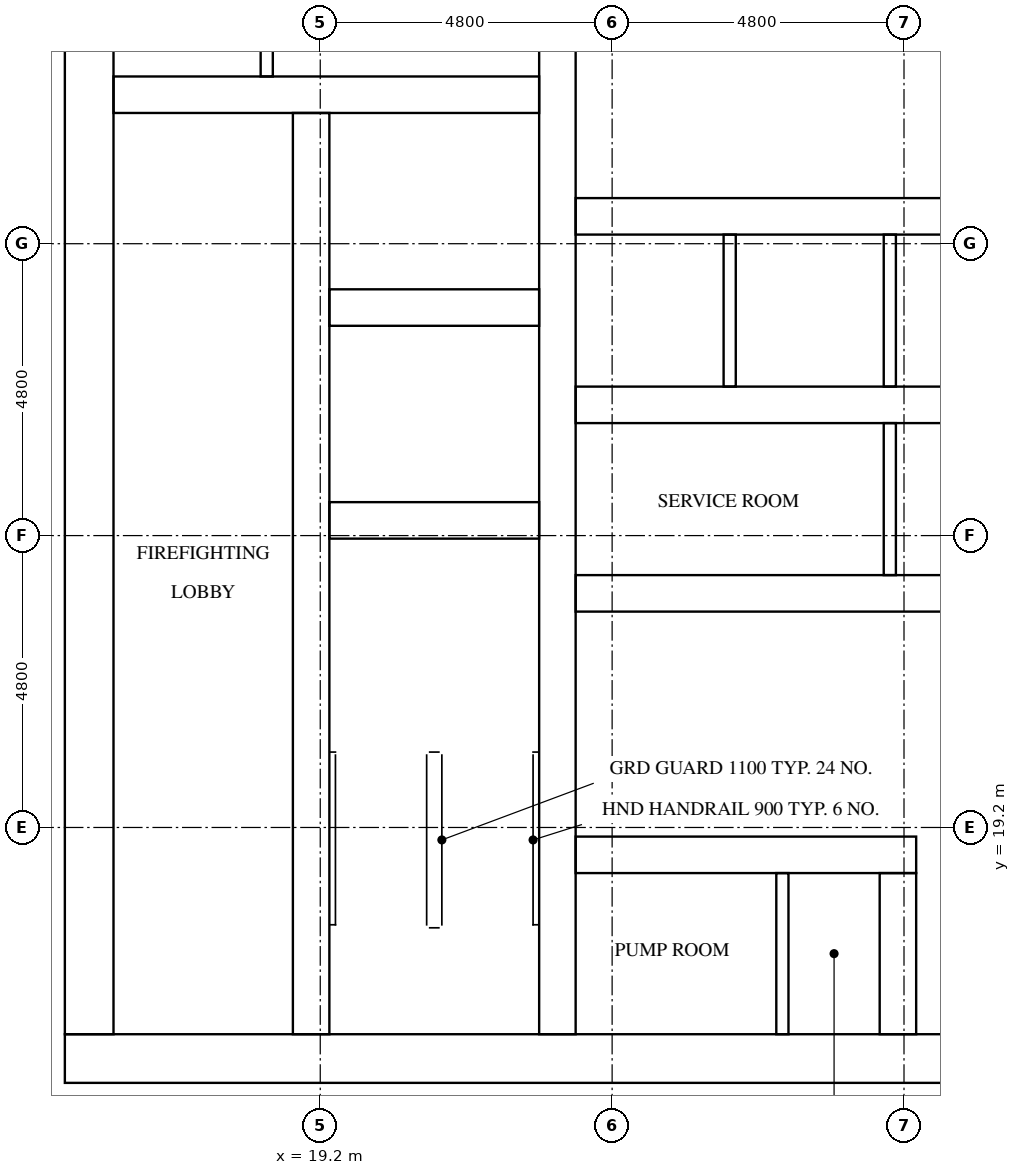
"""IFC4 building model, lengths in metres.
Left out: names, types, materials, properties, quantities, classifications, styles, units other than length and angle.
Written with IfcOpenShell. Run it as: python <this file> out.ifc"""

import sys

from ifc_helpers import new_model, si_unit, direction, frame, frame_2d, origin, place, context, subcontext, project, spatial, rectangle, extrude, element, fill, save


model = new_model("IFC4")
c1 = context("Model", 3, precision=1e-05, world=origin(), true_north=direction((0.0, 1.0)))
c2 = subcontext(c1, "Body", "Model", "MODEL_VIEW")
j1 = project(units=[si_unit("LENGTHUNIT", "METRE"), si_unit("PLANEANGLEUNIT", "RADIAN")], contexts=[c1])
p1 = place(None, origin())
s1 = spatial("IfcSite", under=j1, at=p1, CompositionType="ELEMENT")
p2 = place(p1, origin())
s2 = spatial("IfcBuilding", under=s1, at=p2, CompositionType="ELEMENT")
p3 = place(p2, frame((0.0, 0.0, 159.5)))
s3 = spatial("IfcBuildingStorey", under=s2, at=p3, CompositionType="ELEMENT", Elevation=159.5)
p4 = place(p3, frame((15.0, 15.4, 0.0), z_axis=(0.0, 0.0, 1.0), x_axis=(1.0, 0.0, 0.0)))
e1 = element("IfcWall", 1, at=p4, inside=s3, PredefinedType="SHEAR", context=c2, shape_type="SweptSolid", body=[
    extrude(rectangle(XDim=32.4, YDim=0.8, at=frame_2d((16.2, 0.0))), origin(), (0.0, 0.0, 1.0), 3.2),
])
p5 = place(p4, frame((15.3, 0.0, 0.0)))
e2 = element("IfcOpeningElement", 2, at=p5, cuts=e1, PredefinedType="OPENING", context=c2, shape_type="SweptSolid", body=[
    extrude(rectangle(XDim=1.8, YDim=2.1, at=frame_2d((0.9, 1.05))), frame((0.0, 0.41, 0.0), z_axis=(0.0, -1.0, 0.0), x_axis=(1.0, 0.0, 0.0)), (0.0, 0.0, 1.0), 0.82),
])
p6 = place(p3, frame((15.4, 15.8, 0.0), z_axis=(0.0, 0.0, 1.0), x_axis=(0.0, 1.0, 0.0)))
e3 = element("IfcWall", 3, at=p6, inside=s3, PredefinedType="SHEAR", context=c2, shape_type="SweptSolid", body=[
    extrude(rectangle(XDim=21.2, YDim=0.8, at=frame_2d((10.6, 0.0))), origin(), (0.0, 0.0, 1.0), 3.2),
])
p7 = place(p6, frame((4.96, 0.0, 0.0)))
e4 = element("IfcOpeningElement", 4, at=p7, cuts=e3, PredefinedType="OPENING", context=c2, shape_type="SweptSolid", body=[
    extrude(rectangle(XDim=1.2, YDim=2.1, at=frame_2d((0.6, 1.05))), frame((0.0, 0.41, 0.0), z_axis=(0.0, -1.0, 0.0), x_axis=(1.0, 0.0, 0.0)), (0.0, 0.0, 1.0), 0.82),
])
p8 = place(p3, frame((19.05, 15.8, 0.0), z_axis=(0.0, 0.0, 1.0), x_axis=(0.0, 1.0, 0.0)))
e5 = element("IfcWall", 5, at=p8, inside=s3, PredefinedType="SHEAR", context=c2, shape_type="SweptSolid", body=[
    extrude(rectangle(XDim=15.15, YDim=0.6, at=frame_2d((7.575, 0.0))), origin(), (0.0, 0.0, 1.0), 3.2),
])
p9 = place(p8, frame((9.65, 0.0, 0.0)))
e6 = element("IfcOpeningElement", 6, at=p9, cuts=e5, PredefinedType="OPENING", context=c2, shape_type="SweptSolid", body=[
    extrude(rectangle(XDim=1.1, YDim=2.1, at=frame_2d((0.55, 1.05))), frame((0.0, 0.31, 0.0), z_axis=(0.0, -1.0, 0.0), x_axis=(1.0, 0.0, 0.0)), (0.0, 0.0, 1.0), 0.62),
])
p10 = place(p8, frame((13.15, 0.0, 0.0)))
e7 = element("IfcOpeningElement", 7, at=p10, cuts=e5, PredefinedType="OPENING", context=c2, shape_type="SweptSolid", body=[
    extrude(rectangle(XDim=1.1, YDim=2.1, at=frame_2d((0.55, 1.05))), frame((0.0, 0.31, 0.0), z_axis=(0.0, -1.0, 0.0), x_axis=(1.0, 0.0, 0.0)), (0.0, 0.0, 1.0), 0.62),
])
p11 = place(p8, frame((0.4, 0.0, 0.0)))
e8 = element("IfcOpeningElement", 8, at=p11, cuts=e5, PredefinedType="OPENING", context=c2, shape_type="SweptSolid", body=[
    extrude(rectangle(XDim=1.2, YDim=2.1, at=frame_2d((0.6, 1.05))), frame((0.0, 0.31, 0.0), z_axis=(0.0, -1.0, 0.0), x_axis=(1.0, 0.0, 0.0)), (0.0, 0.0, 1.0), 0.62),
])
p12 = place(p3, frame((23.1, 15.8, 0.0), z_axis=(0.0, 0.0, 1.0), x_axis=(0.0, 1.0, 0.0)))
e9 = element("IfcWall", 9, at=p12, inside=s3, PredefinedType="SHEAR", context=c2, shape_type="SweptSolid", body=[
    extrude(rectangle(XDim=21.2, YDim=0.6, at=frame_2d((10.6, 0.0))), origin(), (0.0, 0.0, 1.0), 3.2),
])
for number, where, z_axis, x_axis in (
    (10, (19.35, 24.25, 0.0), (0.0, 0.0, 1.0), (1.0, 0.0, 0.0)),
    (11, (19.35, 27.75, 0.0), (0.0, 0.0, 1.0), (1.0, 0.0, 0.0)),
):
    element("IfcWall", number, at=place(p3, frame(where, z_axis=z_axis, x_axis=x_axis)), inside=s3, PredefinedType="SHEAR", context=c2, shape_type="SweptSolid", body=[
        extrude(rectangle(XDim=3.45, YDim=0.6, at=frame_2d((1.725, 0.0))), origin(), (0.0, 0.0, 1.0), 3.2),
    ])
p13 = place(p3, frame((15.8, 31.25, 0.0), z_axis=(0.0, 0.0, 1.0), x_axis=(1.0, 0.0, 0.0)))
e12 = element("IfcWall", 12, at=p13, inside=s3, PredefinedType="SHEAR", context=c2, shape_type="SweptSolid", body=[
    extrude(rectangle(XDim=7.0, YDim=0.6, at=frame_2d((3.5, 0.0))), origin(), (0.0, 0.0, 1.0), 3.2),
])
p14 = place(p3, frame((23.4, 18.75, 0.0), z_axis=(0.0, 0.0, 1.0), x_axis=(1.0, 0.0, 0.0)))
e13 = element("IfcWall", 13, at=p14, inside=s3, PredefinedType="SHEAR", context=c2, shape_type="SweptSolid", body=[
    extrude(rectangle(XDim=5.6, YDim=0.6, at=frame_2d((2.8, 0.0))), origin(), (0.0, 0.0, 1.0), 3.2),
])
p15 = place(p14, frame((1.15, 0.0, 0.0)))
e14 = element("IfcOpeningElement", 14, at=p15, cuts=e13, PredefinedType="OPENING", context=c2, shape_type="SweptSolid", body=[
    extrude(rectangle(XDim=1.0, YDim=2.1, at=frame_2d((0.5, 1.05))), frame((0.0, 0.31, 0.0), z_axis=(0.0, -1.0, 0.0), x_axis=(1.0, 0.0, 0.0)), (0.0, 0.0, 1.0), 0.62),
])
p16 = place(p14, frame((3.75, 0.0, 0.0)))
e15 = element("IfcOpeningElement", 15, at=p16, cuts=e13, PredefinedType="OPENING", context=c2, shape_type="SweptSolid", body=[
    extrude(rectangle(XDim=1.0, YDim=2.1, at=frame_2d((0.5, 1.05))), frame((0.0, 0.31, 0.0), z_axis=(0.0, -1.0, 0.0), x_axis=(1.0, 0.0, 0.0)), (0.0, 0.0, 1.0), 0.62),
])
p17 = place(p3, frame((23.4, 23.05, 0.0), z_axis=(0.0, 0.0, 1.0), x_axis=(1.0, 0.0, 0.0)))
e16 = element("IfcWall", 16, at=p17, inside=s3, PredefinedType="SHEAR", context=c2, shape_type="SweptSolid", body=[
    extrude(rectangle(XDim=15.6, YDim=0.6, at=frame_2d((7.8, 0.0))), origin(), (0.0, 0.0, 1.0), 3.2),
])
p18 = place(p17, frame((2.033, 0.0, 0.0)))
e17 = element("IfcOpeningElement", 17, at=p18, cuts=e16, PredefinedType="OPENING", context=c2, shape_type="SweptSolid", body=[
    extrude(rectangle(XDim=1.0, YDim=2.1, at=frame_2d((0.5, 1.05))), frame((0.0, 0.31, 0.0), z_axis=(0.0, -1.0, 0.0), x_axis=(1.0, 0.0, 0.0)), (0.0, 0.0, 1.0), 0.62),
])
p19 = place(p17, frame((11.706, 0.0, 0.0)))
e18 = element("IfcOpeningElement", 18, at=p19, cuts=e16, PredefinedType="OPENING", context=c2, shape_type="SweptSolid", body=[
    extrude(rectangle(XDim=1.0, YDim=2.1, at=frame_2d((0.5, 1.05))), frame((0.0, 0.31, 0.0), z_axis=(0.0, -1.0, 0.0), x_axis=(1.0, 0.0, 0.0)), (0.0, 0.0, 1.0), 0.62),
])
p20 = place(p17, frame((14.339, 0.0, 0.0)))
e19 = element("IfcOpeningElement", 19, at=p20, cuts=e16, PredefinedType="OPENING", context=c2, shape_type="SweptSolid", body=[
    extrude(rectangle(XDim=1.0, YDim=2.1, at=frame_2d((0.5, 1.05))), frame((0.0, 0.31, 0.0), z_axis=(0.0, -1.0, 0.0), x_axis=(1.0, 0.0, 0.0)), (0.0, 0.0, 1.0), 0.62),
])
p21 = place(p3, frame((23.4, 26.15, 0.0), z_axis=(0.0, 0.0, 1.0), x_axis=(1.0, 0.0, 0.0)))
e20 = element("IfcWall", 20, at=p21, inside=s3, PredefinedType="SHEAR", context=c2, shape_type="SweptSolid", body=[
    extrude(rectangle(XDim=15.6, YDim=0.6, at=frame_2d((7.8, 0.0))), origin(), (0.0, 0.0, 1.0), 3.2),
])
p22 = place(p3, frame((23.4, 29.25, 0.0), z_axis=(0.0, 0.0, 1.0), x_axis=(1.0, 0.0, 0.0)))
e21 = element("IfcWall", 21, at=p22, inside=s3, PredefinedType="SHEAR", context=c2, shape_type="SweptSolid", body=[
    extrude(rectangle(XDim=15.6, YDim=0.6, at=frame_2d((7.8, 0.0))), origin(), (0.0, 0.0, 1.0), 3.2),
])
p23 = place(p22, frame((0.667, 0.0, 0.0)))
e22 = element("IfcOpeningElement", 22, at=p23, cuts=e21, PredefinedType="OPENING", context=c2, shape_type="SweptSolid", body=[
    extrude(rectangle(XDim=1.1, YDim=2.1, at=frame_2d((0.55, 1.05))), frame((0.0, 0.31, 0.0), z_axis=(0.0, -1.0, 0.0), x_axis=(1.0, 0.0, 0.0)), (0.0, 0.0, 1.0), 0.62),
])
p24 = place(p22, frame((3.3, 0.0, 0.0)))
e23 = element("IfcOpeningElement", 23, at=p24, cuts=e21, PredefinedType="OPENING", context=c2, shape_type="SweptSolid", body=[
    extrude(rectangle(XDim=1.1, YDim=2.1, at=frame_2d((0.55, 1.05))), frame((0.0, 0.31, 0.0), z_axis=(0.0, -1.0, 0.0), x_axis=(1.0, 0.0, 0.0)), (0.0, 0.0, 1.0), 0.62),
])
p25 = place(p22, frame((5.933, 0.0, 0.0)))
e24 = element("IfcOpeningElement", 24, at=p25, cuts=e21, PredefinedType="OPENING", context=c2, shape_type="SweptSolid", body=[
    extrude(rectangle(XDim=1.1, YDim=2.1, at=frame_2d((0.55, 1.05))), frame((0.0, 0.31, 0.0), z_axis=(0.0, -1.0, 0.0), x_axis=(1.0, 0.0, 0.0)), (0.0, 0.0, 1.0), 0.62),
])
p26 = place(p22, frame((8.567, 0.0, 0.0)))
e25 = element("IfcOpeningElement", 25, at=p26, cuts=e21, PredefinedType="OPENING", context=c2, shape_type="SweptSolid", body=[
    extrude(rectangle(XDim=1.1, YDim=2.1, at=frame_2d((0.55, 1.05))), frame((0.0, 0.31, 0.0), z_axis=(0.0, -1.0, 0.0), x_axis=(1.0, 0.0, 0.0)), (0.0, 0.0, 1.0), 0.62),
])
p27 = place(p22, frame((11.2, 0.0, 0.0)))
e26 = element("IfcOpeningElement", 26, at=p27, cuts=e21, PredefinedType="OPENING", context=c2, shape_type="SweptSolid", body=[
    extrude(rectangle(XDim=1.1, YDim=2.1, at=frame_2d((0.55, 1.05))), frame((0.0, 0.31, 0.0), z_axis=(0.0, -1.0, 0.0), x_axis=(1.0, 0.0, 0.0)), (0.0, 0.0, 1.0), 0.62),
])
p28 = place(p22, frame((13.833, 0.0, 0.0)))
e27 = element("IfcOpeningElement", 27, at=p28, cuts=e21, PredefinedType="OPENING", context=c2, shape_type="SweptSolid", body=[
    extrude(rectangle(XDim=1.1, YDim=2.1, at=frame_2d((0.55, 1.05))), frame((0.0, 0.31, 0.0), z_axis=(0.0, -1.0, 0.0), x_axis=(1.0, 0.0, 0.0)), (0.0, 0.0, 1.0), 0.62),
])
p29 = place(p3, frame((28.7, 15.8, 0.0), z_axis=(0.0, 0.0, 1.0), x_axis=(0.0, 1.0, 0.0)))
e28 = element("IfcWall", 28, at=p29, inside=s3, PredefinedType="SHEAR", context=c2, shape_type="SweptSolid", body=[
    extrude(rectangle(XDim=2.65, YDim=0.6, at=frame_2d((1.325, 0.0))), origin(), (0.0, 0.0, 1.0), 3.2),
])
for number, where, z_axis, x_axis in (
    (29, (25.933, 26.45, 0.0), (0.0, 0.0, 1.0), (0.0, 1.0, 0.0)),
    (30, (28.567, 23.35, 0.0), (0.0, 0.0, 1.0), (0.0, 1.0, 0.0)),
    (31, (28.567, 26.45, 0.0), (0.0, 0.0, 1.0), (0.0, 1.0, 0.0)),
):
    element("IfcWall", number, at=place(p3, frame(where, z_axis=z_axis, x_axis=x_axis)), inside=s3, PredefinedType="SOLIDWALL", context=c2, shape_type="SweptSolid", body=[
        extrude(rectangle(XDim=2.5, YDim=0.2, at=frame_2d((1.25, 0.0))), origin(), (0.0, 0.0, 1.0), 3.2),
    ])
p30 = place(p3, frame((18.32, 31.55, 0.0), z_axis=(0.0, 0.0, 1.0), x_axis=(0.0, 1.0, 0.0)))
e32 = element("IfcWall", 32, at=p30, inside=s3, PredefinedType="PARTITIONING", context=c2, shape_type="SweptSolid", body=[
    extrude(rectangle(XDim=5.45, YDim=0.2, at=frame_2d((2.725, 0.0))), origin(), (0.0, 0.0, 1.0), 3.2),
])
p31 = place(p3, frame((26.8, 15.8, 0.0), z_axis=(0.0, 0.0, 1.0), x_axis=(0.0, 1.0, 0.0)))
e33 = element("IfcWall", 33, at=p31, inside=s3, PredefinedType="PARTITIONING", context=c2, shape_type="SweptSolid", body=[
    extrude(rectangle(XDim=2.65, YDim=0.2, at=frame_2d((1.325, 0.0))), origin(), (0.0, 0.0, 1.0), 3.2),
])
p32 = place(p23, origin())
e34 = element("IfcDoor", 34, at=p32, inside=s3, OperationType="DOUBLE_DOOR_SLIDING", PredefinedType="DOOR", context=c2, shape_type="SweptSolid", body=[
    extrude(rectangle(XDim=1.1, YDim=2.1, at=frame_2d((0.55, 1.05))), frame((0.0, 0.025, 0.0), z_axis=(0.0, -1.0, 0.0), x_axis=(1.0, 0.0, 0.0)), (0.0, 0.0, 1.0), 0.05),
])
fill(e22, e34)
p33 = place(p24, origin())
e35 = element("IfcDoor", 35, at=p33, inside=s3, OperationType="DOUBLE_DOOR_SLIDING", PredefinedType="DOOR", context=c2, shape_type="SweptSolid", body=[
    extrude(rectangle(XDim=1.1, YDim=2.1, at=frame_2d((0.55, 1.05))), frame((0.0, 0.025, 0.0), z_axis=(0.0, -1.0, 0.0), x_axis=(1.0, 0.0, 0.0)), (0.0, 0.0, 1.0), 0.05),
])
fill(e23, e35)
p34 = place(p25, origin())
e36 = element("IfcDoor", 36, at=p34, inside=s3, OperationType="DOUBLE_DOOR_SLIDING", PredefinedType="DOOR", context=c2, shape_type="SweptSolid", body=[
    extrude(rectangle(XDim=1.1, YDim=2.1, at=frame_2d((0.55, 1.05))), frame((0.0, 0.025, 0.0), z_axis=(0.0, -1.0, 0.0), x_axis=(1.0, 0.0, 0.0)), (0.0, 0.0, 1.0), 0.05),
])
fill(e24, e36)
p35 = place(p9, origin())
e37 = element("IfcDoor", 37, at=p35, inside=s3, OperationType="DOUBLE_DOOR_SLIDING", PredefinedType="DOOR", context=c2, shape_type="SweptSolid", body=[
    extrude(rectangle(XDim=1.1, YDim=2.1, at=frame_2d((0.55, 1.05))), frame((0.0, 0.025, 0.0), z_axis=(0.0, -1.0, 0.0), x_axis=(1.0, 0.0, 0.0)), (0.0, 0.0, 1.0), 0.05),
])
fill(e6, e37)
p36 = place(p10, origin())
e38 = element("IfcDoor", 38, at=p36, inside=s3, OperationType="DOUBLE_DOOR_SLIDING", PredefinedType="DOOR", context=c2, shape_type="SweptSolid", body=[
    extrude(rectangle(XDim=1.1, YDim=2.1, at=frame_2d((0.55, 1.05))), frame((0.0, 0.025, 0.0), z_axis=(0.0, -1.0, 0.0), x_axis=(1.0, 0.0, 0.0)), (0.0, 0.0, 1.0), 0.05),
])
fill(e7, e38)
p37 = place(p11, frame((1.2, 0.0, 0.0), z_axis=(0.0, 0.0, 1.0), x_axis=(-1.0, 0.0, 0.0)))
e39 = element("IfcDoor", 39, at=p37, inside=s3, OperationType="SINGLE_SWING_LEFT", PredefinedType="DOOR", context=c2, shape_type="SweptSolid", body=[
    extrude(rectangle(XDim=1.2, YDim=2.1, at=frame_2d((0.6, 1.05))), frame((0.0, 0.025, 0.0), z_axis=(0.0, -1.0, 0.0), x_axis=(1.0, 0.0, 0.0)), (0.0, 0.0, 1.0), 0.05),
])
fill(e8, e39)
p38 = place(p7, frame((1.2, 0.0, 0.0), z_axis=(0.0, 0.0, 1.0), x_axis=(-1.0, 0.0, 0.0)))
e40 = element("IfcDoor", 40, at=p38, inside=s3, OperationType="SINGLE_SWING_RIGHT", PredefinedType="DOOR", context=c2, shape_type="SweptSolid", body=[
    extrude(rectangle(XDim=1.2, YDim=2.1, at=frame_2d((0.6, 1.05))), frame((0.0, 0.025, 0.0), z_axis=(0.0, -1.0, 0.0), x_axis=(1.0, 0.0, 0.0)), (0.0, 0.0, 1.0), 0.05),
])
fill(e4, e40)
p39 = place(p18, frame((1.0, 0.0, 0.0), z_axis=(0.0, 0.0, 1.0), x_axis=(-1.0, 0.0, 0.0)))
e41 = element("IfcDoor", 41, at=p39, inside=s3, OperationType="SINGLE_SWING_RIGHT", PredefinedType="DOOR", context=c2, shape_type="SweptSolid", body=[
    extrude(rectangle(XDim=1.0, YDim=2.1, at=frame_2d((0.5, 1.05))), frame((0.0, 0.025, 0.0), z_axis=(0.0, -1.0, 0.0), x_axis=(1.0, 0.0, 0.0)), (0.0, 0.0, 1.0), 0.05),
])
fill(e17, e41)
p40 = place(p15, origin())
e42 = element("IfcDoor", 42, at=p40, inside=s3, OperationType="SINGLE_SWING_LEFT", PredefinedType="DOOR", context=c2, shape_type="SweptSolid", body=[
    extrude(rectangle(XDim=1.0, YDim=2.1, at=frame_2d((0.5, 1.05))), frame((0.0, 0.025, 0.0), z_axis=(0.0, -1.0, 0.0), x_axis=(1.0, 0.0, 0.0)), (0.0, 0.0, 1.0), 0.05),
])
fill(e14, e42)
p41 = place(p16, origin())
e43 = element("IfcDoor", 43, at=p41, inside=s3, OperationType="SINGLE_SWING_RIGHT", PredefinedType="DOOR", context=c2, shape_type="SweptSolid", body=[
    extrude(rectangle(XDim=1.0, YDim=2.1, at=frame_2d((0.5, 1.05))), frame((0.0, 0.025, 0.0), z_axis=(0.0, -1.0, 0.0), x_axis=(1.0, 0.0, 0.0)), (0.0, 0.0, 1.0), 0.05),
])
fill(e15, e43)
save(model, sys.argv[1])
